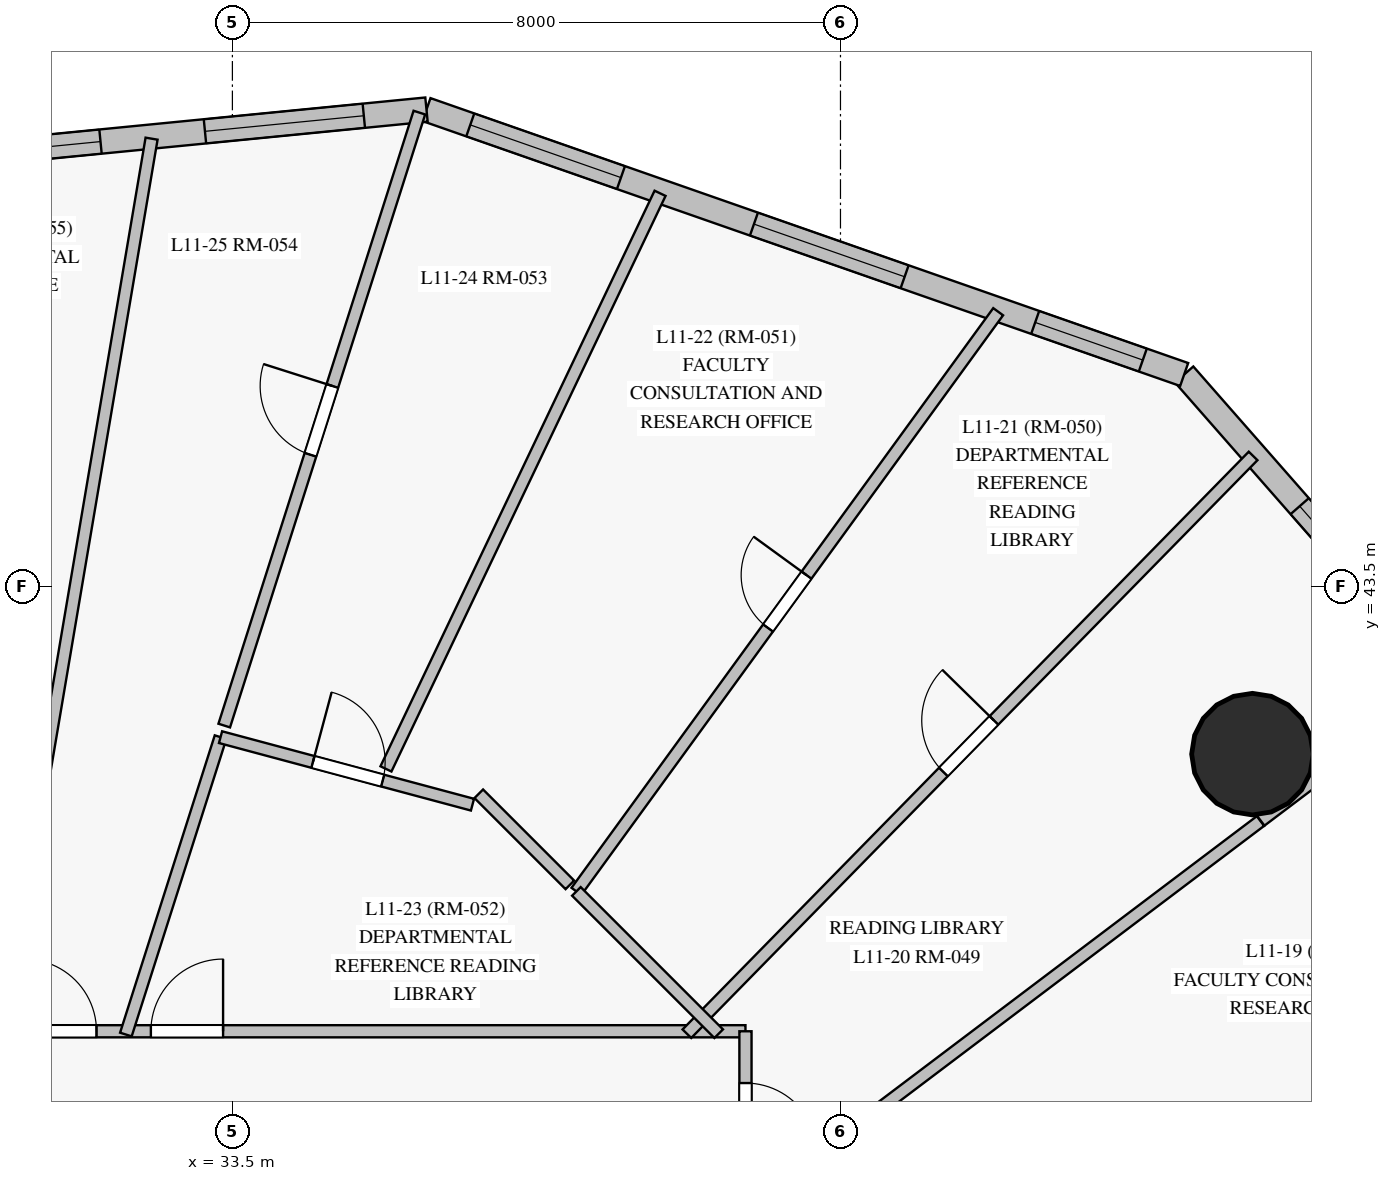
"""IFC4 building model, lengths in metres.
Left out: names, types, materials, properties, quantities, classifications, styles, units other than length and angle.
Written with IfcOpenShell. Run it as: python <this file> out.ifc"""

import sys

from ifc_helpers import new_model, si_unit, direction, frame, frame_2d, origin, origin_with_axes, origin_2d, place, context, subcontext, project, spatial, rectangle, circle, extrude, source, transform, mapped, element, fill, save


model = new_model("IFC4")
c1 = context("Model", 3, precision=1e-05, world=origin(), true_north=direction((0.0, 1.0)))
c2 = subcontext(c1, "Body", "Model", "MODEL_VIEW")
j1 = project(units=[si_unit("LENGTHUNIT", "METRE"), si_unit("PLANEANGLEUNIT", "RADIAN")], contexts=[c1])
p1 = place(None, origin())
s1 = spatial("IfcSite", under=j1, at=p1, CompositionType="ELEMENT")
p2 = place(p1, origin())
s2 = spatial("IfcBuilding", under=s1, at=p2, CompositionType="ELEMENT")
p3 = place(p2, frame((0.0, 0.0, 44.5)))
s3 = spatial("IfcBuildingStorey", under=s2, at=p3, CompositionType="ELEMENT", Elevation=44.5)
m1 = source(origin_with_axes(), c2, "Body", "SweptSolid", [
    extrude(circle(Radius=0.8, at=origin_2d()), origin(), (0.0, 0.0, 1.0), 3.6),
])
p4 = place(p3, frame((46.92, 41.296, 0.0), z_axis=(0.0, 0.0, 1.0), x_axis=(1.0, 0.0, 0.0)))
e1 = element("IfcColumn", 1, at=p4, inside=s3, PredefinedType="COLUMN", context=c2, shape_type="MappedRepresentation", body=[
    mapped(m1, transform((0.0, 0.0, 0.0), scale=1.0)),
])
p5 = place(p3, frame((54.673, 36.431, 0.0), z_axis=(0.0, 0.0, 1.0), x_axis=(-0.659567357533, 0.751645462221, 0.0)))
e2 = element("IfcWall", 2, at=p5, inside=s3, PredefinedType="SOLIDWALL", context=c2, shape_type="SweptSolid", body=[
    extrude(rectangle(XDim=13.117, YDim=0.32, at=frame_2d((6.558, 0.0))), origin(), (0.0, 0.0, 1.0), 3.35),
])
p6 = place(p5, frame((0.589, 0.0, 0.85)))
e3 = element("IfcOpeningElement", 3, at=p6, cuts=e2, PredefinedType="OPENING", context=c2, shape_type="SweptSolid", body=[
    extrude(rectangle(XDim=1.5, YDim=1.85, at=frame_2d((0.75, 0.925))), frame((0.0, 0.17, 0.0), z_axis=(0.0, -1.0, 0.0), x_axis=(1.0, 0.0, 0.0)), (0.0, 0.0, 1.0), 0.34),
])
p7 = place(p5, frame((4.166, 0.0, 0.85)))
e4 = element("IfcOpeningElement", 4, at=p7, cuts=e2, PredefinedType="OPENING", context=c2, shape_type="SweptSolid", body=[
    extrude(rectangle(XDim=2.1, YDim=1.95, at=frame_2d((1.05, 0.975))), frame((0.0, 0.17, 0.0), z_axis=(0.0, -1.0, 0.0), x_axis=(1.0, 0.0, 0.0)), (0.0, 0.0, 1.0), 0.34),
])
p8 = place(p5, frame((8.712, 0.0, 0.85)))
e5 = element("IfcOpeningElement", 5, at=p8, cuts=e2, PredefinedType="OPENING", context=c2, shape_type="SweptSolid", body=[
    extrude(rectangle(XDim=2.1, YDim=1.95, at=frame_2d((1.05, 0.975))), frame((0.0, 0.17, 0.0), z_axis=(0.0, -1.0, 0.0), x_axis=(1.0, 0.0, 0.0)), (0.0, 0.0, 1.0), 0.34),
])
p9 = place(p3, frame((46.022, 46.29, 0.0), z_axis=(0.0, 0.0, 1.0), x_axis=(-0.943970038145, 0.330031160777, 0.0)))
e6 = element("IfcWall", 6, at=p9, inside=s3, PredefinedType="SOLIDWALL", context=c2, shape_type="SweptSolid", body=[
    extrude(rectangle(XDim=10.56, YDim=0.32, at=frame_2d((5.28, 0.0))), origin(), (0.0, 0.0, 1.0), 3.35),
])
p10 = place(p9, frame((0.576, 0.0, 0.85)))
e7 = element("IfcOpeningElement", 7, at=p10, cuts=e6, PredefinedType="OPENING", context=c2, shape_type="SweptSolid", body=[
    extrude(rectangle(XDim=1.5, YDim=1.85, at=frame_2d((0.75, 0.925))), frame((0.0, 0.17, 0.0), z_axis=(0.0, -1.0, 0.0), x_axis=(1.0, 0.0, 0.0)), (0.0, 0.0, 1.0), 0.34),
])
p11 = place(p9, frame((3.896, 0.0, 0.85)))
e8 = element("IfcOpeningElement", 8, at=p11, cuts=e6, PredefinedType="OPENING", context=c2, shape_type="SweptSolid", body=[
    extrude(rectangle(XDim=2.1, YDim=1.95, at=frame_2d((1.05, 0.975))), frame((0.0, 0.17, 0.0), z_axis=(0.0, -1.0, 0.0), x_axis=(1.0, 0.0, 0.0)), (0.0, 0.0, 1.0), 0.34),
])
p12 = place(p9, frame((7.85, 0.0, 0.85)))
e9 = element("IfcOpeningElement", 9, at=p12, cuts=e6, PredefinedType="OPENING", context=c2, shape_type="SweptSolid", body=[
    extrude(rectangle(XDim=2.1, YDim=1.95, at=frame_2d((1.05, 0.975))), frame((0.0, 0.17, 0.0), z_axis=(0.0, -1.0, 0.0), x_axis=(1.0, 0.0, 0.0)), (0.0, 0.0, 1.0), 0.34),
])
p13 = place(p3, frame((36.053, 49.775, 0.0), z_axis=(0.0, 0.0, 1.0), x_axis=(-0.995220186706, -0.097656438461, 0.0)))
e10 = element("IfcWall", 10, at=p13, inside=s3, PredefinedType="SOLIDWALL", context=c2, shape_type="SweptSolid", body=[
    extrude(rectangle(XDim=15.337, YDim=0.32, at=frame_2d((7.669, 0.0))), origin(), (0.0, 0.0, 1.0), 3.35),
])
p14 = place(p13, frame((0.828, 0.0, 0.85)))
e11 = element("IfcOpeningElement", 11, at=p14, cuts=e10, PredefinedType="OPENING", context=c2, shape_type="SweptSolid", body=[
    extrude(rectangle(XDim=2.1, YDim=1.95, at=frame_2d((1.05, 0.975))), frame((0.0, 0.17, 0.0), z_axis=(0.0, -1.0, 0.0), x_axis=(1.0, 0.0, 0.0)), (0.0, 0.0, 1.0), 0.34),
])
p15 = place(p13, frame((4.309, 0.0, 0.85)))
e12 = element("IfcOpeningElement", 12, at=p15, cuts=e10, PredefinedType="OPENING", context=c2, shape_type="SweptSolid", body=[
    extrude(rectangle(XDim=2.1, YDim=1.95, at=frame_2d((1.05, 0.975))), frame((0.0, 0.17, 0.0), z_axis=(0.0, -1.0, 0.0), x_axis=(1.0, 0.0, 0.0)), (0.0, 0.0, 1.0), 0.34),
])
p16 = place(p13, frame((8.234, 0.0, 0.85)))
e13 = element("IfcOpeningElement", 13, at=p16, cuts=e10, PredefinedType="OPENING", context=c2, shape_type="SweptSolid", body=[
    extrude(rectangle(XDim=2.1, YDim=1.95, at=frame_2d((1.05, 0.975))), frame((0.0, 0.17, 0.0), z_axis=(0.0, -1.0, 0.0), x_axis=(1.0, 0.0, 0.0)), (0.0, 0.0, 1.0), 0.34),
])
p17 = place(p13, frame((12.016, 0.0, 0.85)))
e14 = element("IfcOpeningElement", 14, at=p17, cuts=e10, PredefinedType="OPENING", context=c2, shape_type="SweptSolid", body=[
    extrude(rectangle(XDim=2.1, YDim=1.95, at=frame_2d((1.05, 0.975))), frame((0.0, 0.17, 0.0), z_axis=(0.0, -1.0, 0.0), x_axis=(1.0, 0.0, 0.0)), (0.0, 0.0, 1.0), 0.34),
])
p18 = place(p3, frame((10.5, 37.65, 0.0), z_axis=(0.0, 0.0, 1.0), x_axis=(1.0, 0.0, 0.0)))
e15 = element("IfcWall", 15, at=p18, inside=s3, PredefinedType="PARTITIONING", context=c2, shape_type="SweptSolid", body=[
    extrude(rectangle(XDim=29.75, YDim=0.16, at=frame_2d((14.875, 0.0))), origin(), (0.0, 0.0, 1.0), 2.75),
])
p19 = place(p18, frame((21.927, 0.0, 0.0)))
e16 = element("IfcOpeningElement", 16, at=p19, cuts=e15, PredefinedType="OPENING", context=c2, shape_type="SweptSolid", body=[
    extrude(rectangle(XDim=0.95, YDim=2.15, at=frame_2d((0.475, 1.075))), frame((0.0, 0.09, 0.0), z_axis=(0.0, -1.0, 0.0), x_axis=(1.0, 0.0, 0.0)), (0.0, 0.0, 1.0), 0.18),
])
p20 = place(p18, frame((20.262, 0.0, 0.0)))
e17 = element("IfcOpeningElement", 17, at=p20, cuts=e15, PredefinedType="OPENING", context=c2, shape_type="SweptSolid", body=[
    extrude(rectangle(XDim=0.95, YDim=2.15, at=frame_2d((0.475, 1.075))), frame((0.0, 0.09, 0.0), z_axis=(0.0, -1.0, 0.0), x_axis=(1.0, 0.0, 0.0)), (0.0, 0.0, 1.0), 0.18),
])
p21 = place(p18, frame((18.722, 0.0, 0.0)))
e18 = element("IfcOpeningElement", 18, at=p21, cuts=e15, PredefinedType="OPENING", context=c2, shape_type="SweptSolid", body=[
    extrude(rectangle(XDim=0.95, YDim=2.15, at=frame_2d((0.475, 1.075))), frame((0.0, 0.09, 0.0), z_axis=(0.0, -1.0, 0.0), x_axis=(1.0, 0.0, 0.0)), (0.0, 0.0, 1.0), 0.18),
])
p22 = place(p18, frame((14.4, 0.0, 0.0)))
e19 = element("IfcOpeningElement", 19, at=p22, cuts=e15, PredefinedType="OPENING", context=c2, shape_type="SweptSolid", body=[
    extrude(rectangle(XDim=0.95, YDim=2.15, at=frame_2d((0.475, 1.075))), frame((0.0, 0.09, 0.0), z_axis=(0.0, -1.0, 0.0), x_axis=(1.0, 0.0, 0.0)), (0.0, 0.0, 1.0), 0.18),
])
p23 = place(p18, frame((6.962, 0.0, 0.0)))
e20 = element("IfcOpeningElement", 20, at=p23, cuts=e15, PredefinedType="OPENING", context=c2, shape_type="SweptSolid", body=[
    extrude(rectangle(XDim=0.95, YDim=2.15, at=frame_2d((0.475, 1.075))), frame((0.0, 0.09, 0.0), z_axis=(0.0, -1.0, 0.0), x_axis=(1.0, 0.0, 0.0)), (0.0, 0.0, 1.0), 0.18),
])
p24 = place(p3, frame((40.25, 37.65, 0.0), z_axis=(0.0, 0.0, 1.0), x_axis=(0.0, -1.0, 0.0)))
e21 = element("IfcWall", 21, at=p24, inside=s3, PredefinedType="PARTITIONING", context=c2, shape_type="SweptSolid", body=[
    extrude(rectangle(XDim=22.3, YDim=0.16, at=frame_2d((11.15, 0.0))), origin(), (0.0, 0.0, 1.0), 2.75),
])
p25 = place(p24, frame((14.02, 0.0, 0.0)))
e22 = element("IfcOpeningElement", 22, at=p25, cuts=e21, PredefinedType="OPENING", context=c2, shape_type="SweptSolid", body=[
    extrude(rectangle(XDim=0.95, YDim=2.15, at=frame_2d((0.475, 1.075))), frame((0.0, 0.09, 0.0), z_axis=(0.0, -1.0, 0.0), x_axis=(1.0, 0.0, 0.0)), (0.0, 0.0, 1.0), 0.18),
])
p26 = place(p24, frame((11.115, 0.0, 0.0)))
e23 = element("IfcOpeningElement", 23, at=p26, cuts=e21, PredefinedType="OPENING", context=c2, shape_type="SweptSolid", body=[
    extrude(rectangle(XDim=0.95, YDim=2.15, at=frame_2d((0.475, 1.075))), frame((0.0, 0.09, 0.0), z_axis=(0.0, -1.0, 0.0), x_axis=(1.0, 0.0, 0.0)), (0.0, 0.0, 1.0), 0.18),
])
p27 = place(p24, frame((7.397, 0.0, 0.0)))
e24 = element("IfcOpeningElement", 24, at=p27, cuts=e21, PredefinedType="OPENING", context=c2, shape_type="SweptSolid", body=[
    extrude(rectangle(XDim=0.86, YDim=2.1, at=frame_2d((0.43, 1.05))), frame((0.0, 0.09, 0.0), z_axis=(0.0, -1.0, 0.0), x_axis=(1.0, 0.0, 0.0)), (0.0, 0.0, 1.0), 0.18),
])
p28 = place(p24, frame((4.09, 0.0, 0.0)))
e25 = element("IfcOpeningElement", 25, at=p28, cuts=e21, PredefinedType="OPENING", context=c2, shape_type="SweptSolid", body=[
    extrude(rectangle(XDim=0.95, YDim=2.15, at=frame_2d((0.475, 1.075))), frame((0.0, 0.09, 0.0), z_axis=(0.0, -1.0, 0.0), x_axis=(1.0, 0.0, 0.0)), (0.0, 0.0, 1.0), 0.18),
])
p29 = place(p24, frame((2.96, 0.0, 0.0)))
e26 = element("IfcOpeningElement", 26, at=p29, cuts=e21, PredefinedType="OPENING", context=c2, shape_type="SweptSolid", body=[
    extrude(rectangle(XDim=0.95, YDim=2.15, at=frame_2d((0.475, 1.075))), frame((0.0, 0.09, 0.0), z_axis=(0.0, -1.0, 0.0), x_axis=(1.0, 0.0, 0.0)), (0.0, 0.0, 1.0), 0.18),
])
p30 = place(p24, frame((0.681, 0.0, 0.0)))
e27 = element("IfcOpeningElement", 27, at=p30, cuts=e21, PredefinedType="OPENING", context=c2, shape_type="SweptSolid", body=[
    extrude(rectangle(XDim=0.95, YDim=2.15, at=frame_2d((0.475, 1.075))), frame((0.0, 0.09, 0.0), z_axis=(0.0, -1.0, 0.0), x_axis=(1.0, 0.0, 0.0)), (0.0, 0.0, 1.0), 0.18),
])
p31 = place(p24, frame((15.145, 0.0, 0.0)))
e28 = element("IfcOpeningElement", 28, at=p31, cuts=e21, PredefinedType="OPENING", context=c2, shape_type="SweptSolid", body=[
    extrude(rectangle(XDim=0.95, YDim=2.15, at=frame_2d((0.475, 1.075))), frame((0.0, 0.09, 0.0), z_axis=(0.0, -1.0, 0.0), x_axis=(1.0, 0.0, 0.0)), (0.0, 0.0, 1.0), 0.18),
])
p32 = place(p24, frame((9.752, 0.0, 0.0)))
e29 = element("IfcOpeningElement", 29, at=p32, cuts=e21, PredefinedType="OPENING", context=c2, shape_type="SweptSolid", body=[
    extrude(rectangle(XDim=0.86, YDim=2.04, at=frame_2d((0.43, 1.02))), frame((0.0, 0.09, 0.0), z_axis=(0.0, -1.0, 0.0), x_axis=(1.0, 0.0, 0.0)), (0.0, 0.0, 1.0), 0.18),
])
p33 = place(p3, frame((40.223, 32.163, 0.0), z_axis=(0.0, 0.0, 1.0), x_axis=(0.898436111138, 0.439104263477, 0.0)))
e30 = element("IfcWall", 30, at=p33, inside=s3, PredefinedType="PARTITIONING", context=c2, shape_type="SweptSolid", body=[
    extrude(rectangle(XDim=14.146, YDim=0.16, at=frame_2d((7.073, 0.0))), origin(), (0.0, 0.0, 1.0), 3.35),
])
p34 = place(p3, frame((30.444, 37.62, 0.0), z_axis=(0.0, 0.0, 1.0), x_axis=(0.166928333603, 0.985969031684, 0.0)))
e31 = element("IfcWall", 31, at=p34, inside=s3, PredefinedType="PARTITIONING", context=c2, shape_type="SweptSolid", body=[
    extrude(rectangle(XDim=11.94, YDim=0.16, at=frame_2d((5.97, 0.0))), origin(), (0.0, 0.0, 1.0), 3.35),
])
p35 = place(p3, frame((39.479, 37.618, 0.0), z_axis=(0.0, 0.0, 1.0), x_axis=(0.699936539368, 0.714205041187, 0.0)))
e32 = element("IfcWall", 32, at=p35, inside=s3, PredefinedType="PARTITIONING", context=c2, shape_type="SweptSolid", body=[
    extrude(rectangle(XDim=10.643, YDim=0.16, at=frame_2d((5.321, 0.0))), origin(), (0.0, 0.0, 1.0), 3.35),
])
p36 = place(p35, frame((4.821, 0.0, 0.0)))
e33 = element("IfcOpeningElement", 33, at=p36, cuts=e32, PredefinedType="OPENING", context=c2, shape_type="SweptSolid", body=[
    extrude(rectangle(XDim=0.95, YDim=2.15, at=frame_2d((0.475, 1.075))), frame((0.0, 0.09, 0.0), z_axis=(0.0, -1.0, 0.0), x_axis=(1.0, 0.0, 0.0)), (0.0, 0.0, 1.0), 0.18),
])
p37 = place(p3, frame((38.026, 39.49, 0.0), z_axis=(0.0, 0.0, 1.0), x_axis=(0.588360998561, 0.808598377053, 0.0)))
e34 = element("IfcWall", 34, at=p37, inside=s3, PredefinedType="PARTITIONING", context=c2, shape_type="SweptSolid", body=[
    extrude(rectangle(XDim=9.431, YDim=0.16, at=frame_2d((4.716, 0.0))), origin(), (0.0, 0.0, 1.0), 3.35),
])
p38 = place(p37, frame((4.286, 0.0, 0.0)))
e35 = element("IfcOpeningElement", 35, at=p38, cuts=e34, PredefinedType="OPENING", context=c2, shape_type="SweptSolid", body=[
    extrude(rectangle(XDim=0.86, YDim=2.04, at=frame_2d((0.43, 1.02))), frame((0.0, 0.09, 0.0), z_axis=(0.0, -1.0, 0.0), x_axis=(1.0, 0.0, 0.0)), (0.0, 0.0, 1.0), 0.18),
])
p39 = place(p3, frame((40.214, 35.271, 0.0), z_axis=(0.0, 0.0, 1.0), x_axis=(0.797987752762, 0.602673664965, 0.0)))
e36 = element("IfcWall", 36, at=p39, inside=s3, PredefinedType="PARTITIONING", context=c2, shape_type="SweptSolid", body=[
    extrude(rectangle(XDim=8.536, YDim=0.16, at=frame_2d((4.268, 0.0))), origin(), (0.0, 0.0, 1.0), 3.35),
])
p40 = place(p3, frame((33.393, 41.672, 0.0), z_axis=(0.0, 0.0, 1.0), x_axis=(0.303320350776, 0.952888642395, 0.0)))
e37 = element("IfcWall", 37, at=p40, inside=s3, PredefinedType="PARTITIONING", context=c2, shape_type="SweptSolid", body=[
    extrude(rectangle(XDim=8.463, YDim=0.16, at=frame_2d((4.231, 0.0))), origin(), (0.0, 0.0, 1.0), 3.35),
])
p41 = place(p40, frame((3.739, 0.0, 0.0)))
e38 = element("IfcOpeningElement", 38, at=p41, cuts=e37, PredefinedType="OPENING", context=c2, shape_type="SweptSolid", body=[
    extrude(rectangle(XDim=0.95, YDim=2.15, at=frame_2d((0.475, 1.075))), frame((0.0, 0.09, 0.0), z_axis=(0.0, -1.0, 0.0), x_axis=(1.0, 0.0, 0.0)), (0.0, 0.0, 1.0), 0.18),
])
p42 = place(p3, frame((35.52, 41.102, 0.0), z_axis=(0.0, 0.0, 1.0), x_axis=(0.429957308005, 0.902849219578, 0.0)))
e39 = element("IfcWall", 39, at=p42, inside=s3, PredefinedType="PARTITIONING", context=c2, shape_type="SweptSolid", body=[
    extrude(rectangle(XDim=8.387, YDim=0.16, at=frame_2d((4.194, 0.0))), origin(), (0.0, 0.0, 1.0), 3.35),
])
p43 = place(p3, frame((32.099, 37.607, 0.0), z_axis=(0.0, 0.0, 1.0), x_axis=(0.303390190683, 0.952866408369, 0.0)))
e40 = element("IfcWall", 40, at=p43, inside=s3, PredefinedType="PARTITIONING", context=c2, shape_type="SweptSolid", body=[
    extrude(rectangle(XDim=4.106, YDim=0.16, at=frame_2d((2.053, 0.0))), origin(), (0.0, 0.0, 1.0), 3.35),
])
p44 = place(p3, frame((33.344, 41.519, 0.0), z_axis=(0.0, 0.0, 1.0), x_axis=(0.965920102757, -0.258840404672, 0.0)))
e41 = element("IfcWall", 41, at=p44, inside=s3, PredefinedType="PARTITIONING", context=c2, shape_type="SweptSolid", body=[
    extrude(rectangle(XDim=3.431, YDim=0.16, at=frame_2d((1.716, 0.0))), origin(), (0.0, 0.0, 1.0), 3.35),
])
p45 = place(p44, frame((1.259, 0.0, 0.0)))
e42 = element("IfcOpeningElement", 42, at=p45, cuts=e41, PredefinedType="OPENING", context=c2, shape_type="SweptSolid", body=[
    extrude(rectangle(XDim=0.95, YDim=2.15, at=frame_2d((0.475, 1.075))), frame((0.0, 0.09, 0.0), z_axis=(0.0, -1.0, 0.0), x_axis=(1.0, 0.0, 0.0)), (0.0, 0.0, 1.0), 0.18),
])
p46 = place(p3, frame((39.898, 37.618, 0.0), z_axis=(0.0, 0.0, 1.0), x_axis=(-0.707106781187, 0.707106781187, 0.0)))
e43 = element("IfcWall", 43, at=p46, inside=s3, PredefinedType="PARTITIONING", context=c2, shape_type="SweptSolid", body=[
    extrude(rectangle(XDim=2.647, YDim=0.16, at=frame_2d((1.324, 0.0))), origin(), (0.0, 0.0, 1.0), 2.75),
])
p47 = place(p3, frame((47.03, 40.419, 0.0), z_axis=(0.0, 0.0, 1.0), x_axis=(0.798019150984, 0.602632088975, 0.0)))
e44 = element("IfcWall", 44, at=p47, inside=s3, PredefinedType="PARTITIONING", context=c2, shape_type="SweptSolid", body=[
    extrude(rectangle(XDim=3.127, YDim=0.16, at=frame_2d((1.564, 0.0))), origin(), (0.0, 0.0, 1.0), 3.35),
])
p48 = place(p3, frame((37.94, 39.576, 0.0), z_axis=(0.0, 0.0, 1.0), x_axis=(-0.707106781187, 0.707106781187, 0.0)))
e45 = element("IfcWall", 45, at=p48, inside=s3, PredefinedType="PARTITIONING", context=c2, shape_type="SweptSolid", body=[
    extrude(rectangle(XDim=1.695, YDim=0.16, at=frame_2d((0.847, 0.0))), origin(), (0.0, 0.0, 1.0), 2.75),
])
m2 = source(origin_with_axes(), c2, "Body", "SweptSolid", [
    extrude(rectangle(XDim=2.1, YDim=1.95, at=frame_2d((1.05, 0.975))), frame((0.0, 0.03, 0.0), z_axis=(0.0, -1.0, 0.0), x_axis=(1.0, 0.0, 0.0)), (0.0, 0.0, 1.0), 0.06),
])
p49 = place(p8, origin())
e46 = element("IfcWindow", 46, at=p49, inside=s3, PartitioningType="SINGLE_PANEL", PredefinedType="WINDOW", context=c2, shape_type="MappedRepresentation", body=[
    mapped(m2, transform((0.0, 0.0, 0.0), scale=1.0)),
])
fill(e5, e46)
m3 = source(origin_with_axes(), c2, "Body", "SweptSolid", [
    extrude(rectangle(XDim=1.5, YDim=1.85, at=frame_2d((0.75, 0.925))), frame((0.0, 0.03, 0.0), z_axis=(0.0, -1.0, 0.0), x_axis=(1.0, 0.0, 0.0)), (0.0, 0.0, 1.0), 0.06),
])
p50 = place(p10, origin())
e47 = element("IfcWindow", 47, at=p50, inside=s3, PartitioningType="SINGLE_PANEL", PredefinedType="WINDOW", context=c2, shape_type="MappedRepresentation", body=[
    mapped(m3, transform((0.0, 0.0, 0.0), scale=1.0)),
])
fill(e7, e47)
p51 = place(p11, origin())
e48 = element("IfcWindow", 48, at=p51, inside=s3, PartitioningType="SINGLE_PANEL", PredefinedType="WINDOW", context=c2, shape_type="MappedRepresentation", body=[
    mapped(m2, transform((0.0, 0.0, 0.0), scale=1.0)),
])
fill(e8, e48)
p52 = place(p12, origin())
e49 = element("IfcWindow", 49, at=p52, inside=s3, PartitioningType="SINGLE_PANEL", PredefinedType="WINDOW", context=c2, shape_type="MappedRepresentation", body=[
    mapped(m2, transform((0.0, 0.0, 0.0), scale=1.0)),
])
fill(e9, e49)
p53 = place(p14, origin())
e50 = element("IfcWindow", 50, at=p53, inside=s3, PartitioningType="SINGLE_PANEL", PredefinedType="WINDOW", context=c2, shape_type="MappedRepresentation", body=[
    mapped(m2, transform((0.0, 0.0, 0.0), scale=1.0)),
])
fill(e11, e50)
p54 = place(p15, origin())
e51 = element("IfcWindow", 51, at=p54, inside=s3, PartitioningType="SINGLE_PANEL", PredefinedType="WINDOW", context=c2, shape_type="MappedRepresentation", body=[
    mapped(m2, transform((0.0, 0.0, 0.0), scale=1.0)),
])
fill(e12, e51)
m4 = source(origin_with_axes(), c2, "Body", "SweptSolid", [
    extrude(rectangle(XDim=0.95, YDim=2.15, at=frame_2d((0.475, 1.075))), frame((0.0, 0.025, 0.0), z_axis=(0.0, -1.0, 0.0), x_axis=(1.0, 0.0, 0.0)), (0.0, 0.0, 1.0), 0.05),
])
p55 = place(p30, origin())
e52 = element("IfcDoor", 52, at=p55, inside=s3, OperationType="SINGLE_SWING_RIGHT", PredefinedType="DOOR", context=c2, shape_type="MappedRepresentation", body=[
    mapped(m4, transform((0.0, 0.0, 0.0), scale=1.0)),
])
fill(e27, e52)
p56 = place(p19, origin())
e53 = element("IfcDoor", 53, at=p56, inside=s3, OperationType="SINGLE_SWING_RIGHT", PredefinedType="DOOR", context=c2, shape_type="MappedRepresentation", body=[
    mapped(m4, transform((0.0, 0.0, 0.0), scale=1.0)),
])
fill(e16, e53)
p57 = place(p20, origin())
e54 = element("IfcDoor", 54, at=p57, inside=s3, OperationType="SINGLE_SWING_LEFT", PredefinedType="DOOR", context=c2, shape_type="MappedRepresentation", body=[
    mapped(m4, transform((0.0, 0.0, 0.0), scale=1.0)),
])
fill(e17, e54)
p58 = place(p36, origin())
e55 = element("IfcDoor", 55, at=p58, inside=s3, OperationType="SINGLE_SWING_RIGHT", PredefinedType="DOOR", context=c2, shape_type="MappedRepresentation", body=[
    mapped(m4, transform((0.0, 0.0, 0.0), scale=1.0)),
])
fill(e33, e55)
p59 = place(p45, origin())
e56 = element("IfcDoor", 56, at=p59, inside=s3, OperationType="SINGLE_SWING_LEFT", PredefinedType="DOOR", context=c2, shape_type="MappedRepresentation", body=[
    mapped(m4, transform((0.0, 0.0, 0.0), scale=1.0)),
])
fill(e42, e56)
p60 = place(p41, origin())
e57 = element("IfcDoor", 57, at=p60, inside=s3, OperationType="SINGLE_SWING_RIGHT", PredefinedType="DOOR", context=c2, shape_type="MappedRepresentation", body=[
    mapped(m4, transform((0.0, 0.0, 0.0), scale=1.0)),
])
fill(e38, e57)
m5 = source(origin_with_axes(), c2, "Body", "SweptSolid", [
    extrude(rectangle(XDim=0.86, YDim=2.04, at=frame_2d((0.43, 1.02))), frame((0.0, 0.025, 0.0), z_axis=(0.0, -1.0, 0.0), x_axis=(1.0, 0.0, 0.0)), (0.0, 0.0, 1.0), 0.05),
])
p61 = place(p38, origin())
e58 = element("IfcDoor", 58, at=p61, inside=s3, OperationType="SINGLE_SWING_RIGHT", PredefinedType="DOOR", context=c2, shape_type="MappedRepresentation", body=[
    mapped(m5, transform((0.0, 0.0, 0.0), scale=1.0)),
])
fill(e35, e58)
save(model, sys.argv[1])
